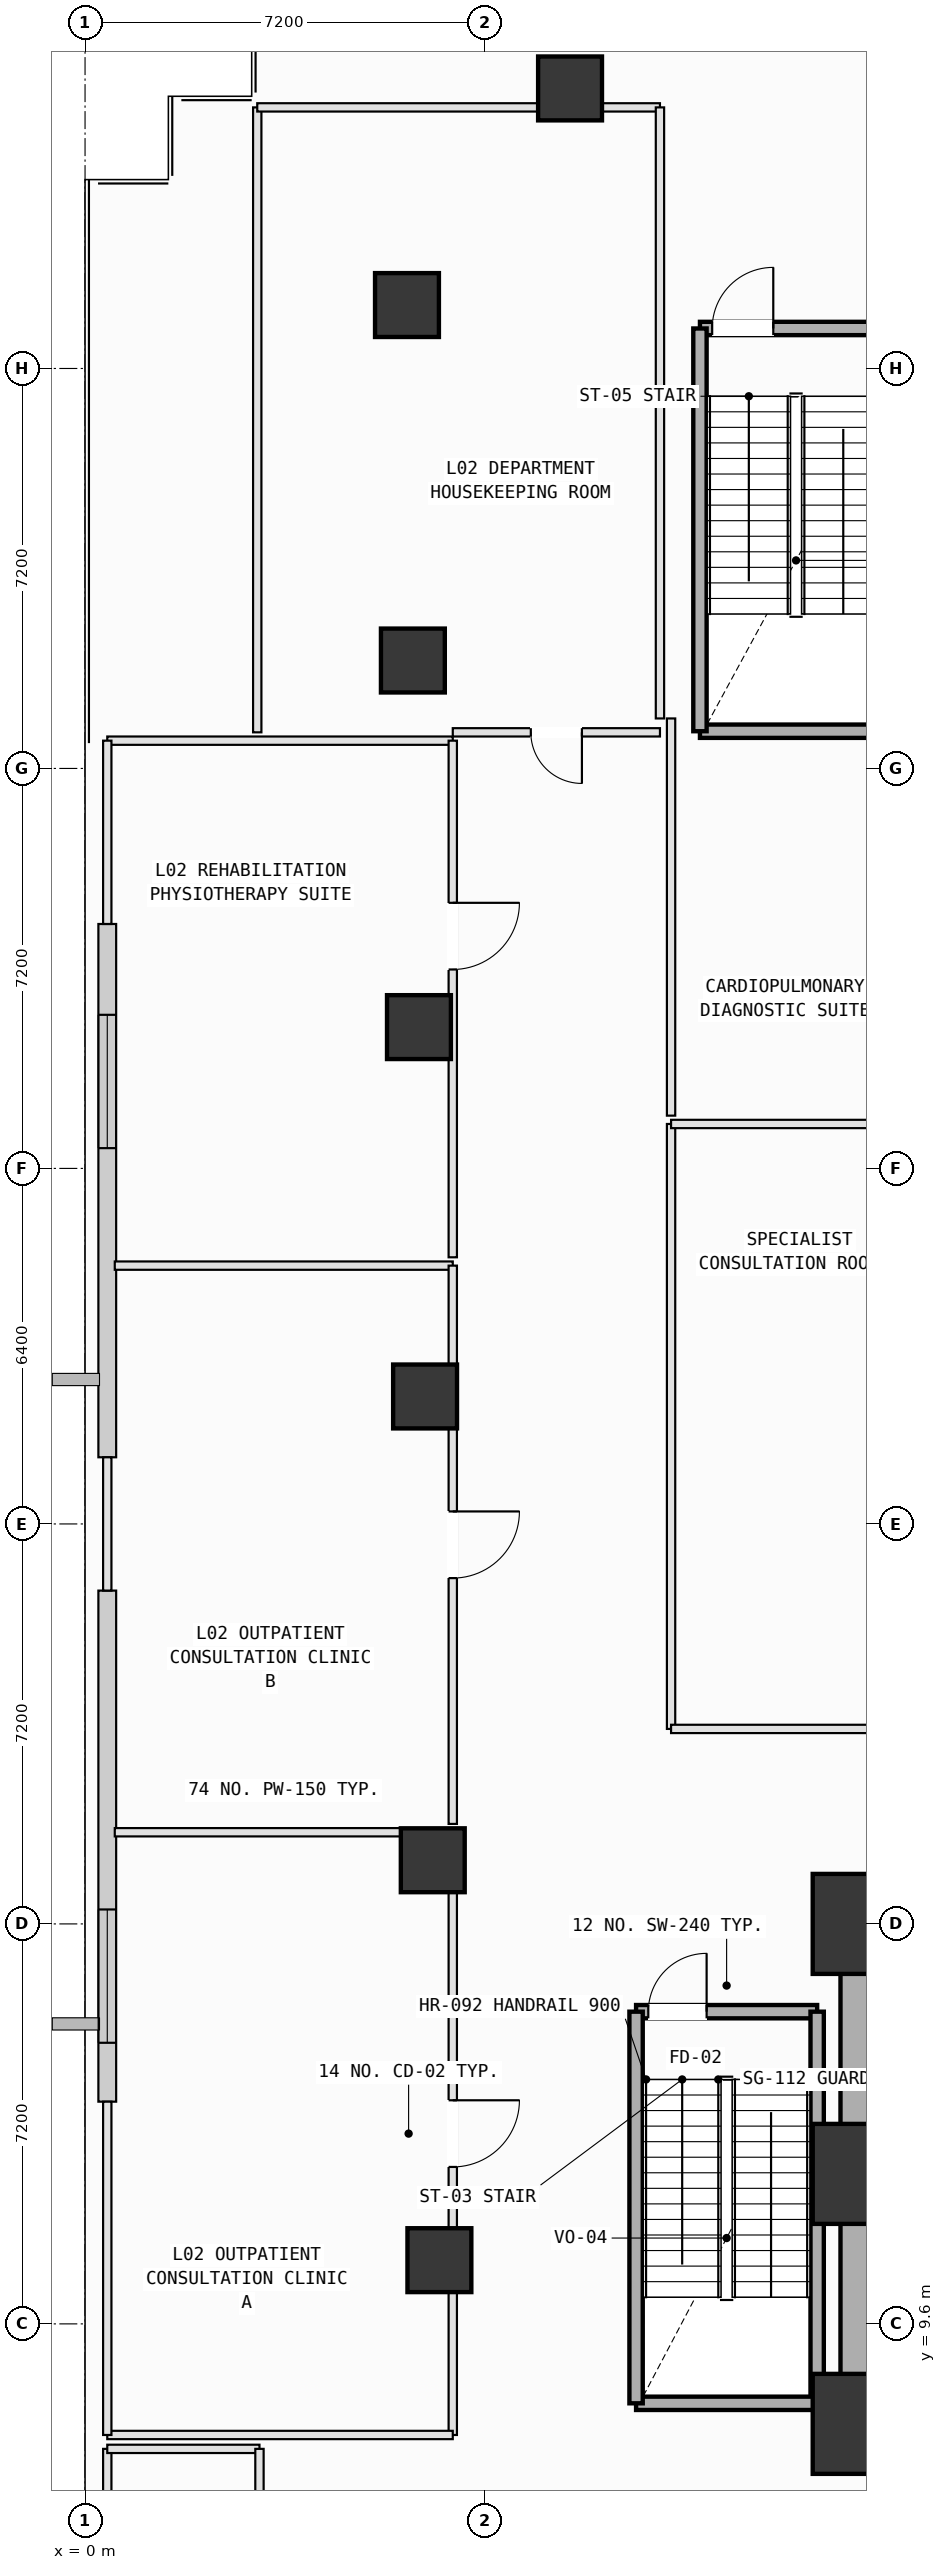
"""IFC4 building model, lengths in metres.
Left out: names, types, materials, properties, quantities, classifications, styles, units other than length and angle.
Written with IfcOpenShell. Run it as: python <this file> out.ifc"""

import sys

from ifc_helpers import new_model, si_unit, direction, frame, frame_2d, origin, origin_2d, place, context, subcontext, project, spatial, rectangle, extrude, element, fill, save


model = new_model("IFC4")
c1 = context("Model", 3, precision=1e-05, world=origin(), true_north=direction((0.0, 1.0)))
c2 = subcontext(c1, "Body", "Model", "MODEL_VIEW")
j1 = project(units=[si_unit("LENGTHUNIT", "METRE"), si_unit("PLANEANGLEUNIT", "RADIAN")], contexts=[c1])
p1 = place(None, origin())
s1 = spatial("IfcSite", under=j1, at=p1, CompositionType="ELEMENT")
p2 = place(p1, origin())
s2 = spatial("IfcBuilding", under=s1, at=p2, CompositionType="ELEMENT")
p3 = place(p2, frame((0.0, 0.0, 10.8)))
s3 = spatial("IfcBuildingStorey", under=s2, at=p3, CompositionType="ELEMENT", Elevation=10.8)
for number, where, z_axis, x_axis in (
    (1, (14.0, 7.8, 0.0), (0.0, 0.0, 1.0), (1.0, 0.0, 0.0)),
    (2, (14.0, 12.3, 0.0), (0.0, 0.0, 1.0), (1.0, 0.0, 0.0)),
    (3, (14.0, 16.8, 0.0), (0.0, 0.0, 1.0), (1.0, 0.0, 0.0)),
):
    element("IfcColumn", number, at=place(p3, frame(where, z_axis=z_axis, x_axis=x_axis)), inside=s3, PredefinedType="COLUMN", context=c2, shape_type="SweptSolid", body=[
        extrude(rectangle(XDim=1.8, YDim=1.8, at=origin_2d()), origin(), (0.0, 0.0, 1.0), 5.4),
    ])
for number, where, z_axis, x_axis in (
    (4, (8.731, 49.841, 0.0), (0.0, 0.0, 1.0), (1.0, 0.0, 0.0)),
    (5, (5.796, 45.942, 0.0), (0.0, 0.0, 1.0), (1.0, 0.0, 0.0)),
    (6, (5.902, 39.543, 0.0), (0.0, 0.0, 1.0), (1.0, 0.0, 0.0)),
    (7, (6.011, 32.944, 0.0), (0.0, 0.0, 1.0), (1.0, 0.0, 0.0)),
    (8, (6.121, 26.295, 0.0), (0.0, 0.0, 1.0), (1.0, 0.0, 0.0)),
    (9, (6.26, 17.946, 0.0), (0.0, 0.0, 1.0), (1.0, 0.0, 0.0)),
    (10, (6.379, 10.747, 0.0), (0.0, 0.0, 1.0), (1.0, 0.0, 0.0)),
):
    element("IfcColumn", number, at=place(p3, frame(where, z_axis=z_axis, x_axis=x_axis)), inside=s3, PredefinedType="COLUMN", context=c2, shape_type="SweptSolid", body=[
        extrude(rectangle(XDim=1.15, YDim=1.15, at=origin_2d()), origin(), (0.0, 0.0, 1.0), 5.4),
    ])
p4 = place(p3, frame((0.4, 13.6, 0.0), z_axis=(0.0, 0.0, 1.0), x_axis=(0.0, 1.0, 0.0)))
e11 = element("IfcWall", 11, at=p4, inside=s3, PredefinedType="SOLIDWALL", context=c2, shape_type="SweptSolid", body=[
    extrude(rectangle(XDim=9.2, YDim=0.32, at=frame_2d((4.6, 0.0))), origin(), (0.0, 0.0, 1.0), 4.23),
])
p5 = place(p4, frame((1.06, 0.0, 0.8)))
e12 = element("IfcOpeningElement", 12, at=p5, cuts=e11, PredefinedType="OPENING", context=c2, shape_type="SweptSolid", body=[
    extrude(rectangle(XDim=2.4, YDim=2.2, at=frame_2d((1.2, 1.1))), frame((0.0, 0.17, 0.0), z_axis=(0.0, -1.0, 0.0), x_axis=(1.0, 0.0, 0.0)), (0.0, 0.0, 1.0), 0.34),
])
p6 = place(p3, frame((0.4, 25.2, 0.0), z_axis=(0.0, 0.0, 1.0), x_axis=(0.0, 1.0, 0.0)))
e13 = element("IfcWall", 13, at=p6, inside=s3, PredefinedType="SOLIDWALL", context=c2, shape_type="SweptSolid", body=[
    extrude(rectangle(XDim=9.6, YDim=0.32, at=frame_2d((4.8, 0.0))), origin(), (0.0, 0.0, 1.0), 4.23),
])
p7 = place(p6, frame((5.565, 0.0, 0.8)))
e14 = element("IfcOpeningElement", 14, at=p7, cuts=e13, PredefinedType="OPENING", context=c2, shape_type="SweptSolid", body=[
    extrude(rectangle(XDim=2.4, YDim=2.2, at=frame_2d((1.2, 1.1))), frame((0.0, 0.17, 0.0), z_axis=(0.0, -1.0, 0.0), x_axis=(1.0, 0.0, 0.0)), (0.0, 0.0, 1.0), 0.34),
])
p8 = place(p3, frame((9.92, 15.22, 0.0), z_axis=(0.0, 0.0, 1.0), x_axis=(1.0, 0.0, 0.0)))
e15 = element("IfcWall", 15, at=p8, inside=s3, PredefinedType="SOLIDWALL", context=c2, shape_type="SweptSolid", body=[
    extrude(rectangle(XDim=3.26, YDim=0.24, at=frame_2d((1.63, 0.0))), origin(), (0.0, 0.0, 1.0), 5.15),
])
p9 = place(p8, frame((0.22, 0.0, 0.0)))
e16 = element("IfcOpeningElement", 16, at=p9, cuts=e15, PredefinedType="OPENING", context=c2, shape_type="SweptSolid", body=[
    extrude(rectangle(XDim=1.05, YDim=2.15, at=frame_2d((0.525, 1.075))), frame((0.0, 0.13, 0.0), z_axis=(0.0, -1.0, 0.0), x_axis=(1.0, 0.0, 0.0)), (0.0, 0.0, 1.0), 0.26),
])
p10 = place(p3, frame((13.18, 15.22, 0.0), z_axis=(0.0, 0.0, 1.0), x_axis=(0.0, -1.0, 0.0)))
e17 = element("IfcWall", 17, at=p10, inside=s3, PredefinedType="SOLIDWALL", context=c2, shape_type="SweptSolid", body=[
    extrude(rectangle(XDim=7.05, YDim=0.24, at=frame_2d((3.525, 0.0))), origin(), (0.0, 0.0, 1.0), 5.15),
])
p11 = place(p3, frame((13.18, 8.17, 0.0), z_axis=(0.0, 0.0, 1.0), x_axis=(-1.0, 0.0, 0.0)))
e18 = element("IfcWall", 18, at=p11, inside=s3, PredefinedType="SOLIDWALL", context=c2, shape_type="SweptSolid", body=[
    extrude(rectangle(XDim=3.26, YDim=0.24, at=frame_2d((1.63, 0.0))), origin(), (0.0, 0.0, 1.0), 5.15),
])
p12 = place(p3, frame((9.92, 8.17, 0.0), z_axis=(0.0, 0.0, 1.0), x_axis=(0.0, 1.0, 0.0)))
e19 = element("IfcWall", 19, at=p12, inside=s3, PredefinedType="SOLIDWALL", context=c2, shape_type="SweptSolid", body=[
    extrude(rectangle(XDim=7.05, YDim=0.24, at=frame_2d((3.525, 0.0))), origin(), (0.0, 0.0, 1.0), 5.15),
])
p13 = place(p3, frame((11.07, 45.52, 0.0), z_axis=(0.0, 0.0, 1.0), x_axis=(1.0, 0.0, 0.0)))
e20 = element("IfcWall", 20, at=p13, inside=s3, PredefinedType="SOLIDWALL", context=c2, shape_type="SweptSolid", body=[
    extrude(rectangle(XDim=3.46, YDim=0.24, at=frame_2d((1.73, 0.0))), origin(), (0.0, 0.0, 1.0), 5.15),
])
p14 = place(p13, frame((0.22, 0.0, 0.0)))
e21 = element("IfcOpeningElement", 21, at=p14, cuts=e20, PredefinedType="OPENING", context=c2, shape_type="SweptSolid", body=[
    extrude(rectangle(XDim=1.1, YDim=2.15, at=frame_2d((0.55, 1.075))), frame((0.0, 0.13, 0.0), z_axis=(0.0, -1.0, 0.0), x_axis=(1.0, 0.0, 0.0)), (0.0, 0.0, 1.0), 0.26),
])
p15 = place(p3, frame((14.53, 38.27, 0.0), z_axis=(0.0, 0.0, 1.0), x_axis=(-1.0, 0.0, 0.0)))
e22 = element("IfcWall", 22, at=p15, inside=s3, PredefinedType="SOLIDWALL", context=c2, shape_type="SweptSolid", body=[
    extrude(rectangle(XDim=3.46, YDim=0.24, at=frame_2d((1.73, 0.0))), origin(), (0.0, 0.0, 1.0), 5.15),
])
p16 = place(p3, frame((11.07, 38.27, 0.0), z_axis=(0.0, 0.0, 1.0), x_axis=(0.0, 1.0, 0.0)))
e23 = element("IfcWall", 23, at=p16, inside=s3, PredefinedType="SOLIDWALL", context=c2, shape_type="SweptSolid", body=[
    extrude(rectangle(XDim=7.25, YDim=0.24, at=frame_2d((3.625, 0.0))), origin(), (0.0, 0.0, 1.0), 5.15),
])
p17 = place(p3, frame((14.0, 7.8, 0.0), z_axis=(0.0, 0.0, 1.0), x_axis=(1.0, 0.0, 0.0)))
e24 = element("IfcWall", 24, at=p17, inside=s3, PredefinedType="SHEAR", context=c2, shape_type="SweptSolid", body=[
    extrude(rectangle(XDim=10.8, YDim=0.8, at=frame_2d((5.4, 0.0))), origin(), (0.0, 0.0, 1.0), 5.15),
])
p18 = place(p3, frame((14.0, 16.8, 0.0), z_axis=(0.0, 0.0, 1.0), x_axis=(0.0, -1.0, 0.0)))
e25 = element("IfcWall", 25, at=p18, inside=s3, PredefinedType="SHEAR", context=c2, shape_type="SweptSolid", body=[
    extrude(rectangle(XDim=9.0, YDim=0.8, at=frame_2d((4.5, 0.0))), origin(), (0.0, 0.0, 1.0), 5.15),
])
p19 = place(p3, frame((0.535, 18.45, 0.0), z_axis=(0.0, 0.0, 1.0), x_axis=(1.0, 0.0, 0.0)))
e26 = element("IfcWall", 26, at=p19, inside=s3, PredefinedType="PARTITIONING", context=c2, shape_type="SweptSolid", body=[
    extrude(rectangle(XDim=6.085, YDim=0.15, at=frame_2d((3.042, 0.0))), origin(), (0.0, 0.0, 1.0), 4.235),
])
p20 = place(p3, frame((6.62, 18.45, 0.0), z_axis=(0.0, 0.0, 1.0), x_axis=(0.0, -1.0, 0.0)))
e27 = element("IfcWall", 27, at=p20, inside=s3, PredefinedType="PARTITIONING", context=c2, shape_type="SweptSolid", body=[
    extrude(rectangle(XDim=10.85, YDim=0.15, at=frame_2d((5.425, 0.0))), origin(), (0.0, 0.0, 1.0), 4.235),
])
p21 = place(p20, frame((4.825, 0.0, 0.0)))
e28 = element("IfcOpeningElement", 28, at=p21, cuts=e27, PredefinedType="OPENING", context=c2, shape_type="SweptSolid", body=[
    extrude(rectangle(XDim=1.2, YDim=2.15, at=frame_2d((0.6, 1.075))), frame((0.0, 0.085, 0.0), z_axis=(0.0, -1.0, 0.0), x_axis=(1.0, 0.0, 0.0)), (0.0, 0.0, 1.0), 0.17),
])
p22 = place(p3, frame((6.62, 7.6, 0.0), z_axis=(0.0, 0.0, 1.0), x_axis=(-1.0, 0.0, 0.0)))
e29 = element("IfcWall", 29, at=p22, inside=s3, PredefinedType="PARTITIONING", context=c2, shape_type="SweptSolid", body=[
    extrude(rectangle(XDim=6.22, YDim=0.15, at=frame_2d((3.11, 0.0))), origin(), (0.0, 0.0, 1.0), 5.15),
])
p23 = place(p3, frame((0.4, 7.6, 0.0), z_axis=(0.0, 0.0, 1.0), x_axis=(0.0, 1.0, 0.0)))
e30 = element("IfcWall", 30, at=p23, inside=s3, PredefinedType="PARTITIONING", context=c2, shape_type="SweptSolid", body=[
    extrude(rectangle(XDim=6.0, YDim=0.15, at=frame_2d((3.0, 0.0))), origin(), (0.0, 0.0, 1.0), 5.15),
])
p24 = place(p3, frame((0.535, 28.65, 0.0), z_axis=(0.0, 0.0, 1.0), x_axis=(1.0, 0.0, 0.0)))
e31 = element("IfcWall", 31, at=p24, inside=s3, PredefinedType="PARTITIONING", context=c2, shape_type="SweptSolid", body=[
    extrude(rectangle(XDim=6.085, YDim=0.15, at=frame_2d((3.042, 0.0))), origin(), (0.0, 0.0, 1.0), 5.15),
])
p25 = place(p3, frame((6.62, 28.65, 0.0), z_axis=(0.0, 0.0, 1.0), x_axis=(0.0, -1.0, 0.0)))
e32 = element("IfcWall", 32, at=p25, inside=s3, PredefinedType="PARTITIONING", context=c2, shape_type="SweptSolid", body=[
    extrude(rectangle(XDim=10.05, YDim=0.15, at=frame_2d((5.025, 0.0))), origin(), (0.0, 0.0, 1.0), 4.235),
])
p26 = place(p25, frame((4.425, 0.0, 0.0)))
e33 = element("IfcOpeningElement", 33, at=p26, cuts=e32, PredefinedType="OPENING", context=c2, shape_type="SweptSolid", body=[
    extrude(rectangle(XDim=1.2, YDim=2.15, at=frame_2d((0.6, 1.075))), frame((0.0, 0.085, 0.0), z_axis=(0.0, -1.0, 0.0), x_axis=(1.0, 0.0, 0.0)), (0.0, 0.0, 1.0), 0.17),
])
p27 = place(p3, frame((0.4, 22.8, 0.0), z_axis=(0.0, 0.0, 1.0), x_axis=(0.0, 1.0, 0.0)))
e34 = element("IfcWall", 34, at=p27, inside=s3, PredefinedType="PARTITIONING", context=c2, shape_type="SweptSolid", body=[
    extrude(rectangle(XDim=2.4, YDim=0.15, at=frame_2d((1.2, 0.0))), origin(), (0.0, 0.0, 1.0), 5.15),
])
p28 = place(p3, frame((0.4, 38.1, 0.0), z_axis=(0.0, 0.0, 1.0), x_axis=(1.0, 0.0, 0.0)))
e35 = element("IfcWall", 35, at=p28, inside=s3, PredefinedType="PARTITIONING", context=c2, shape_type="SweptSolid", body=[
    extrude(rectangle(XDim=6.22, YDim=0.15, at=frame_2d((3.11, 0.0))), origin(), (0.0, 0.0, 1.0), 5.15),
])
p29 = place(p3, frame((6.62, 38.1, 0.0), z_axis=(0.0, 0.0, 1.0), x_axis=(0.0, -1.0, 0.0)))
e36 = element("IfcWall", 36, at=p29, inside=s3, PredefinedType="PARTITIONING", context=c2, shape_type="SweptSolid", body=[
    extrude(rectangle(XDim=9.3, YDim=0.15, at=frame_2d((4.65, 0.0))), origin(), (0.0, 0.0, 1.0), 4.235),
])
p30 = place(p29, frame((2.919, 0.0, 0.0)))
e37 = element("IfcOpeningElement", 37, at=p30, cuts=e36, PredefinedType="OPENING", context=c2, shape_type="SweptSolid", body=[
    extrude(rectangle(XDim=1.2, YDim=2.15, at=frame_2d((0.6, 1.075))), frame((0.0, 0.085, 0.0), z_axis=(0.0, -1.0, 0.0), x_axis=(1.0, 0.0, 0.0)), (0.0, 0.0, 1.0), 0.17),
])
p31 = place(p3, frame((0.4, 34.8, 0.0), z_axis=(0.0, 0.0, 1.0), x_axis=(0.0, 1.0, 0.0)))
e38 = element("IfcWall", 38, at=p31, inside=s3, PredefinedType="PARTITIONING", context=c2, shape_type="SweptSolid", body=[
    extrude(rectangle(XDim=3.3, YDim=0.15, at=frame_2d((1.65, 0.0))), origin(), (0.0, 0.0, 1.0), 5.15),
])
p32 = place(p3, frame((0.4, 3.0, 0.0), z_axis=(0.0, 0.0, 1.0), x_axis=(0.0, 1.0, 0.0)))
e39 = element("IfcWall", 39, at=p32, inside=s3, PredefinedType="PARTITIONING", context=c2, shape_type="SweptSolid", body=[
    extrude(rectangle(XDim=4.35, YDim=0.15, at=frame_2d((2.175, 0.0))), origin(), (0.0, 0.0, 1.0), 5.15),
])
p33 = place(p3, frame((0.4, 7.35, 0.0), z_axis=(0.0, 0.0, 1.0), x_axis=(1.0, 0.0, 0.0)))
e40 = element("IfcWall", 40, at=p33, inside=s3, PredefinedType="PARTITIONING", context=c2, shape_type="SweptSolid", body=[
    extrude(rectangle(XDim=2.74, YDim=0.15, at=frame_2d((1.37, 0.0))), origin(), (0.0, 0.0, 1.0), 5.15),
])
p34 = place(p3, frame((3.14, 7.35, 0.0), z_axis=(0.0, 0.0, 1.0), x_axis=(0.0, -1.0, 0.0)))
e41 = element("IfcWall", 41, at=p34, inside=s3, PredefinedType="PARTITIONING", context=c2, shape_type="SweptSolid", body=[
    extrude(rectangle(XDim=2.256, YDim=0.15, at=frame_2d((1.128, 0.0))), origin(), (0.0, 0.0, 1.0), 5.15),
])
p35 = place(p3, frame((10.55, 20.31, 0.0), z_axis=(0.0, 0.0, 1.0), x_axis=(0.0, 1.0, 0.0)))
e42 = element("IfcWall", 42, at=p35, inside=s3, PredefinedType="PARTITIONING", context=c2, shape_type="SweptSolid", body=[
    extrude(rectangle(XDim=10.89, YDim=0.15, at=frame_2d((5.445, 0.0))), origin(), (0.0, 0.0, 1.0), 5.15),
])
for number, where, z_axis, x_axis in (
    (43, (10.55, 31.2, 0.0), (0.0, 0.0, 1.0), (1.0, 0.0, 0.0)),
    (44, (15.14, 20.31, 0.0), (0.0, 0.0, 1.0), (-1.0, 0.0, 0.0)),
):
    element("IfcWall", number, at=place(p3, frame(where, z_axis=z_axis, x_axis=x_axis)), inside=s3, PredefinedType="PARTITIONING", context=c2, shape_type="SweptSolid", body=[
        extrude(rectangle(XDim=4.59, YDim=0.15, at=frame_2d((2.295, 0.0))), origin(), (0.0, 0.0, 1.0), 5.15),
    ])
p36 = place(p3, frame((10.55, 31.35, 0.0), z_axis=(0.0, 0.0, 1.0), x_axis=(0.0, 1.0, 0.0)))
e45 = element("IfcWall", 45, at=p36, inside=s3, PredefinedType="PARTITIONING", context=c2, shape_type="SweptSolid", body=[
    extrude(rectangle(XDim=7.15, YDim=0.15, at=frame_2d((3.575, 0.0))), origin(), (0.0, 0.0, 1.0), 5.15),
])
p37 = place(p3, frame((10.35, 38.25, 0.0), z_axis=(0.0, 0.0, 1.0), x_axis=(-1.0, 0.0, 0.0)))
e46 = element("IfcWall", 46, at=p37, inside=s3, PredefinedType="PARTITIONING", context=c2, shape_type="SweptSolid", body=[
    extrude(rectangle(XDim=3.73, YDim=0.15, at=frame_2d((1.865, 0.0))), origin(), (0.0, 0.0, 1.0), 5.15),
])
p38 = place(p37, frame((1.405, 0.0, 0.0)))
e47 = element("IfcOpeningElement", 47, at=p38, cuts=e46, PredefinedType="OPENING", context=c2, shape_type="SweptSolid", body=[
    extrude(rectangle(XDim=0.92, YDim=2.1, at=frame_2d((0.46, 1.05))), frame((0.0, 0.085, 0.0), z_axis=(0.0, -1.0, 0.0), x_axis=(1.0, 0.0, 0.0)), (0.0, 0.0, 1.0), 0.17),
])
p39 = place(p3, frame((3.1, 38.25, 0.0), z_axis=(0.0, 0.0, 1.0), x_axis=(0.0, 1.0, 0.0)))
e48 = element("IfcWall", 48, at=p39, inside=s3, PredefinedType="PARTITIONING", context=c2, shape_type="SweptSolid", body=[
    extrude(rectangle(XDim=11.25, YDim=0.15, at=frame_2d((5.625, 0.0))), origin(), (0.0, 0.0, 1.0), 5.15),
])
p40 = place(p3, frame((3.1, 49.5, 0.0), z_axis=(0.0, 0.0, 1.0), x_axis=(1.0, 0.0, 0.0)))
e49 = element("IfcWall", 49, at=p40, inside=s3, PredefinedType="PARTITIONING", context=c2, shape_type="SweptSolid", body=[
    extrude(rectangle(XDim=7.25, YDim=0.15, at=frame_2d((3.625, 0.0))), origin(), (0.0, 0.0, 1.0), 4.235),
])
p41 = place(p3, frame((10.35, 49.5, 0.0), z_axis=(0.0, 0.0, 1.0), x_axis=(0.0, -1.0, 0.0)))
e50 = element("IfcWall", 50, at=p41, inside=s3, PredefinedType="PARTITIONING", context=c2, shape_type="SweptSolid", body=[
    extrude(rectangle(XDim=11.0, YDim=0.15, at=frame_2d((5.5, 0.0))), origin(), (0.0, 0.0, 1.0), 5.15),
])
p42 = place(p5, origin())
e51 = element("IfcWindow", 51, at=p42, inside=s3, PartitioningType="SINGLE_PANEL", PredefinedType="WINDOW", context=c2, shape_type="SweptSolid", body=[
    extrude(rectangle(XDim=2.4, YDim=2.2, at=frame_2d((1.2, 1.1))), frame((0.0, 0.03, 0.0), z_axis=(0.0, -1.0, 0.0), x_axis=(1.0, 0.0, 0.0)), (0.0, 0.0, 1.0), 0.06),
])
fill(e12, e51)
p43 = place(p7, origin())
e52 = element("IfcWindow", 52, at=p43, inside=s3, PartitioningType="SINGLE_PANEL", PredefinedType="WINDOW", context=c2, shape_type="SweptSolid", body=[
    extrude(rectangle(XDim=2.4, YDim=2.2, at=frame_2d((1.2, 1.1))), frame((0.0, 0.03, 0.0), z_axis=(0.0, -1.0, 0.0), x_axis=(1.0, 0.0, 0.0)), (0.0, 0.0, 1.0), 0.06),
])
fill(e14, e52)
p44 = place(p9, origin())
e53 = element("IfcDoor", 53, at=p44, inside=s3, OperationType="SINGLE_SWING_RIGHT", PredefinedType="DOOR", context=c2, shape_type="SweptSolid", body=[
    extrude(rectangle(XDim=1.05, YDim=2.15, at=frame_2d((0.525, 1.075))), frame((0.0, 0.025, 0.0), z_axis=(0.0, -1.0, 0.0), x_axis=(1.0, 0.0, 0.0)), (0.0, 0.0, 1.0), 0.05),
])
fill(e16, e53)
p45 = place(p14, origin())
e54 = element("IfcDoor", 54, at=p45, inside=s3, OperationType="SINGLE_SWING_RIGHT", PredefinedType="DOOR", context=c2, shape_type="SweptSolid", body=[
    extrude(rectangle(XDim=1.1, YDim=2.15, at=frame_2d((0.55, 1.075))), frame((0.0, 0.025, 0.0), z_axis=(0.0, -1.0, 0.0), x_axis=(1.0, 0.0, 0.0)), (0.0, 0.0, 1.0), 0.05),
])
fill(e21, e54)
p46 = place(p21, origin())
e55 = element("IfcDoor", 55, at=p46, inside=s3, OperationType="SINGLE_SWING_LEFT", PredefinedType="DOOR", context=c2, shape_type="SweptSolid", body=[
    extrude(rectangle(XDim=1.2, YDim=2.15, at=frame_2d((0.6, 1.075))), frame((0.0, 0.025, 0.0), z_axis=(0.0, -1.0, 0.0), x_axis=(1.0, 0.0, 0.0)), (0.0, 0.0, 1.0), 0.05),
])
fill(e28, e55)
p47 = place(p26, origin())
e56 = element("IfcDoor", 56, at=p47, inside=s3, OperationType="SINGLE_SWING_LEFT", PredefinedType="DOOR", context=c2, shape_type="SweptSolid", body=[
    extrude(rectangle(XDim=1.2, YDim=2.15, at=frame_2d((0.6, 1.075))), frame((0.0, 0.025, 0.0), z_axis=(0.0, -1.0, 0.0), x_axis=(1.0, 0.0, 0.0)), (0.0, 0.0, 1.0), 0.05),
])
fill(e33, e56)
p48 = place(p30, origin())
e57 = element("IfcDoor", 57, at=p48, inside=s3, OperationType="SINGLE_SWING_LEFT", PredefinedType="DOOR", context=c2, shape_type="SweptSolid", body=[
    extrude(rectangle(XDim=1.2, YDim=2.15, at=frame_2d((0.6, 1.075))), frame((0.0, 0.025, 0.0), z_axis=(0.0, -1.0, 0.0), x_axis=(1.0, 0.0, 0.0)), (0.0, 0.0, 1.0), 0.05),
])
fill(e37, e57)
p49 = place(p38, origin())
e58 = element("IfcDoor", 58, at=p49, inside=s3, OperationType="SINGLE_SWING_LEFT", PredefinedType="DOOR", context=c2, shape_type="SweptSolid", body=[
    extrude(rectangle(XDim=0.92, YDim=2.1, at=frame_2d((0.46, 1.05))), frame((0.0, 0.025, 0.0), z_axis=(0.0, -1.0, 0.0), x_axis=(1.0, 0.0, 0.0)), (0.0, 0.0, 1.0), 0.05),
])
fill(e47, e58)
save(model, sys.argv[1])
